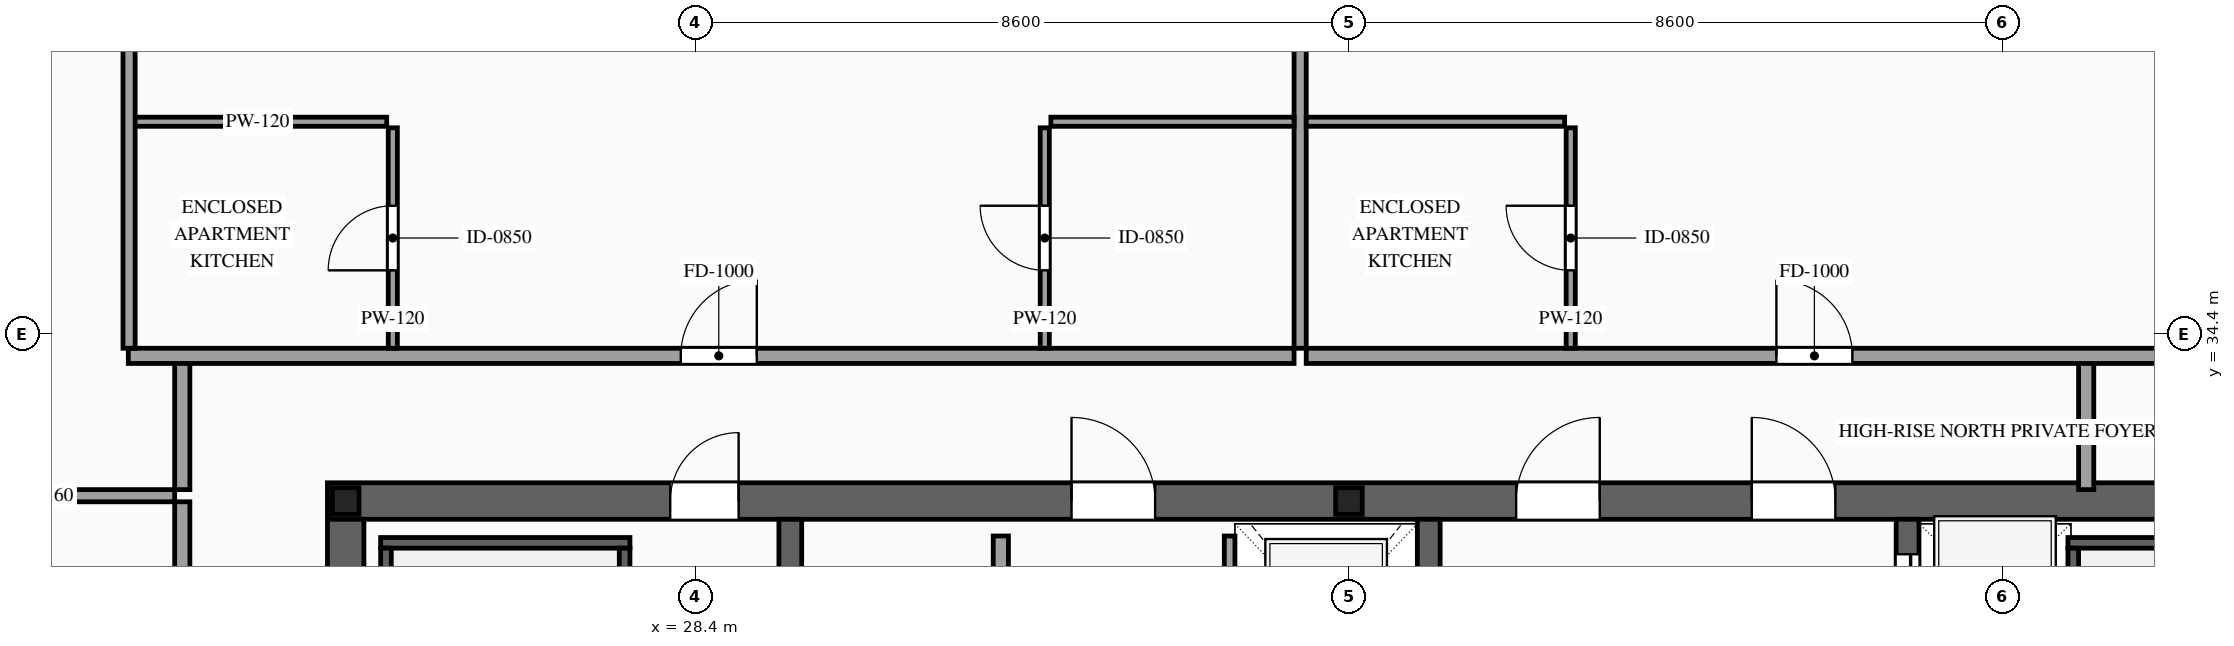
"""IFC4 building model, lengths in metres.
Left out: names, types, materials, properties, quantities, classifications, styles, units other than length and angle.
Written with IfcOpenShell. Run it as: python <this file> out.ifc"""

import sys

from ifc_helpers import new_model, si_unit, direction, frame, frame_2d, origin, origin_2d, place, context, subcontext, project, spatial, rectangle, i_section, extrude, source, transform, mapped, element, fill, save


model = new_model("IFC4")
c1 = context("Model", 3, precision=1e-05, world=origin(), true_north=direction((0.0, 1.0)))
c2 = subcontext(c1, "Body", "Model", "MODEL_VIEW")
j1 = project(units=[si_unit("LENGTHUNIT", "METRE"), si_unit("PLANEANGLEUNIT", "RADIAN")], contexts=[c1])
p1 = place(None, origin())
s1 = spatial("IfcSite", under=j1, at=p1, CompositionType="ELEMENT")
p2 = place(p1, origin())
s2 = spatial("IfcBuilding", under=s1, at=p2, CompositionType="ELEMENT")
p3 = place(p2, frame((0.0, 0.0, 325.2)))
s3 = spatial("IfcBuildingStorey", under=s2, at=p3, CompositionType="ELEMENT", Elevation=325.2)
p4 = place(p3, frame((23.56, 32.2, 0.0), z_axis=(0.0, 0.0, 1.0), x_axis=(1.0, 0.0, 0.0)))
e1 = element("IfcWall", 1, at=p4, inside=s3, PredefinedType="SHEAR", context=c2, shape_type="SweptSolid", body=[
    extrude(rectangle(XDim=26.88, YDim=0.48, at=frame_2d((13.44, 0.0))), origin(), (0.0, 0.0, 1.0), 3.5),
])
p5 = place(p4, frame((4.51, 0.0, 0.0)))
e2 = element("IfcOpeningElement", 2, at=p5, cuts=e1, PredefinedType="OPENING", context=c2, shape_type="SweptSolid", body=[
    extrude(rectangle(XDim=0.9, YDim=2.15, at=frame_2d((0.45, 1.075))), frame((0.0, 0.255, 0.0), z_axis=(0.0, -1.0, 0.0), x_axis=(1.0, 0.0, 0.0)), (0.0, 0.0, 1.0), 0.51),
])
p6 = place(p4, frame((9.79, 0.0, 0.0)))
e3 = element("IfcOpeningElement", 3, at=p6, cuts=e1, PredefinedType="OPENING", context=c2, shape_type="SweptSolid", body=[
    extrude(rectangle(XDim=1.1, YDim=2.2, at=frame_2d((0.55, 1.1))), frame((0.0, 0.255, 0.0), z_axis=(0.0, -1.0, 0.0), x_axis=(1.0, 0.0, 0.0)), (0.0, 0.0, 1.0), 0.51),
])
p7 = place(p4, frame((15.64, 0.0, 0.0)))
e4 = element("IfcOpeningElement", 4, at=p7, cuts=e1, PredefinedType="OPENING", context=c2, shape_type="SweptSolid", body=[
    extrude(rectangle(XDim=1.1, YDim=2.2, at=frame_2d((0.55, 1.1))), frame((0.0, 0.255, 0.0), z_axis=(0.0, -1.0, 0.0), x_axis=(1.0, 0.0, 0.0)), (0.0, 0.0, 1.0), 0.51),
])
p8 = place(p4, frame((18.74, 0.0, 0.0)))
e5 = element("IfcOpeningElement", 5, at=p8, cuts=e1, PredefinedType="OPENING", context=c2, shape_type="SweptSolid", body=[
    extrude(rectangle(XDim=1.1, YDim=2.2, at=frame_2d((0.55, 1.1))), frame((0.0, 0.255, 0.0), z_axis=(0.0, -1.0, 0.0), x_axis=(1.0, 0.0, 0.0)), (0.0, 0.0, 1.0), 0.51),
])
m1 = source(origin(), c2, "Body", "SweptSolid", [
    extrude(rectangle(XDim=12.32, YDim=0.48, at=frame_2d((6.16, 0.0))), origin(), (0.0, 0.0, 1.0), 3.5),
])
p9 = place(p3, frame((23.8, 19.64, 0.0), z_axis=(0.0, 0.0, 1.0), x_axis=(0.0, 1.0, 0.0)))
e6 = element("IfcWall", 6, at=p9, inside=s3, PredefinedType="SHEAR", context=c2, shape_type="MappedRepresentation", body=[
    mapped(m1, transform((0.0, 0.0, 0.0), scale=1.0)),
])
m2 = source(origin(), c2, "Body", "SweptSolid", [
    extrude(rectangle(XDim=12.32, YDim=0.3, at=frame_2d((6.16, 0.0))), origin(), (0.0, 0.0, 1.0), 3.5),
])
for number, where, z_axis, x_axis in (
    (7, (29.65, 19.64, 0.0), (0.0, 0.0, 1.0), (0.0, 1.0, 0.0)),
    (8, (38.05, 19.64, 0.0), (0.0, 0.0, 1.0), (0.0, 1.0, 0.0)),
):
    element("IfcWall", number, at=place(p3, frame(where, z_axis=z_axis, x_axis=x_axis)), inside=s3, PredefinedType="SOLIDWALL", context=c2, shape_type="MappedRepresentation", body=[
        mapped(m2, transform((0.0, 0.0, 0.0), scale=1.0)),
    ])
p10 = place(p3, frame((44.35, 19.64, 0.0), z_axis=(0.0, 0.0, 1.0), x_axis=(0.0, 1.0, 0.0)))
e9 = element("IfcWall", 9, at=p10, inside=s3, PredefinedType="SOLIDWALL", context=c2, shape_type="SweptSolid", body=[
    extrude(rectangle(XDim=12.32, YDim=0.3, at=frame_2d((6.16, 0.0))), origin(), (0.0, 0.0, 1.0), 3.5),
])
p11 = place(p10, frame((6.56, 0.0, 0.0)))
e10 = element("IfcOpeningElement", 10, at=p11, cuts=e9, PredefinedType="OPENING", context=c2, shape_type="SweptSolid", body=[
    extrude(rectangle(XDim=1.1, YDim=2.2, at=frame_2d((0.55, 1.1))), frame((0.0, 0.165, 0.0), z_axis=(0.0, -1.0, 0.0), x_axis=(1.0, 0.0, 0.0)), (0.0, 0.0, 1.0), 0.33),
])
p12 = place(p10, frame((8.66, 0.0, 0.0)))
e11 = element("IfcOpeningElement", 11, at=p12, cuts=e9, PredefinedType="OPENING", context=c2, shape_type="SweptSolid", body=[
    extrude(rectangle(XDim=1.1, YDim=2.2, at=frame_2d((0.55, 1.1))), frame((0.0, 0.165, 0.0), z_axis=(0.0, -1.0, 0.0), x_axis=(1.0, 0.0, 0.0)), (0.0, 0.0, 1.0), 0.33),
])
p13 = place(p10, frame((10.76, 0.0, 0.0)))
e12 = element("IfcOpeningElement", 12, at=p13, cuts=e9, PredefinedType="OPENING", context=c2, shape_type="SweptSolid", body=[
    extrude(rectangle(XDim=1.1, YDim=2.2, at=frame_2d((0.55, 1.1))), frame((0.0, 0.165, 0.0), z_axis=(0.0, -1.0, 0.0), x_axis=(1.0, 0.0, 0.0)), (0.0, 0.0, 1.0), 0.33),
])
m3 = source(origin(), c2, "Body", "SweptSolid", [
    extrude(i_section(OverallWidth=0.35, OverallDepth=0.35, WebThickness=0.012, FlangeThickness=0.019, at=origin_2d()), origin(), (0.0, 0.0, 1.0), 3.5),
])
for number, where, z_axis, x_axis in (
    (13, (23.8, 32.2, 0.0), (0.0, 0.0, 1.0), (1.0, 0.0, 0.0)),
    (14, (37.0, 32.2, 0.0), (0.0, 0.0, 1.0), (1.0, 0.0, 0.0)),
):
    element("IfcColumn", number, at=place(p3, frame(where, z_axis=z_axis, x_axis=x_axis)), inside=s3, PredefinedType="COLUMN", context=c2, shape_type="MappedRepresentation", body=[
        mapped(m3, transform((0.0, 0.0, 0.0), scale=1.0)),
    ])
p14 = place(p3, frame((35.43, 29.4, 0.0), z_axis=(0.0, 0.0, 1.0), x_axis=(0.0, 1.0, 0.0)))
e15 = element("IfcWall", 15, at=p14, inside=s3, PredefinedType="SOLIDWALL", context=c2, shape_type="SweptSolid", body=[
    extrude(rectangle(XDim=2.34, YDim=0.14, at=frame_2d((1.17, 0.0))), origin(), (0.0, 0.0, 1.0), 3.28),
])
p15 = place(p14, frame((0.62, 0.0, 0.0)))
e16 = element("IfcOpeningElement", 16, at=p15, cuts=e15, PredefinedType="OPENING", context=c2, shape_type="SweptSolid", body=[
    extrude(rectangle(XDim=1.1, YDim=2.2, at=frame_2d((0.55, 1.1))), frame((0.0, 0.085, 0.0), z_axis=(0.0, -1.0, 0.0), x_axis=(1.0, 0.0, 0.0)), (0.0, 0.0, 1.0), 0.17),
])
m4 = source(origin(), c2, "Body", "SweptSolid", [
    extrude(rectangle(XDim=3.28, YDim=0.14, at=frame_2d((1.64, 0.0))), origin(), (0.0, 0.0, 1.0), 3.28),
])
p16 = place(p3, frame((24.26, 31.65, 0.0), z_axis=(0.0, 0.0, 1.0), x_axis=(1.0, 0.0, 0.0)))
e17 = element("IfcWall", 17, at=p16, inside=s3, PredefinedType="SOLIDWALL", context=c2, shape_type="MappedRepresentation", body=[
    mapped(m4, transform((0.0, 0.0, 0.0), scale=1.0)),
])
m5 = source(origin(), c2, "Body", "SweptSolid", [
    extrude(rectangle(XDim=8.94, YDim=0.14, at=frame_2d((4.47, 0.0))), origin(), (0.0, 0.0, 1.0), 3.28),
])
for number, where, z_axis, x_axis in (
    (18, (24.33, 22.64, 0.0), (0.0, 0.0, 1.0), (0.0, 1.0, 0.0)),
    (19, (27.47, 22.64, 0.0), (0.0, 0.0, 1.0), (0.0, 1.0, 0.0)),
):
    element("IfcWall", number, at=place(p3, frame(where, z_axis=z_axis, x_axis=x_axis)), inside=s3, PredefinedType="SOLIDWALL", context=c2, shape_type="MappedRepresentation", body=[
        mapped(m5, transform((0.0, 0.0, 0.0), scale=1.0)),
    ])
p17 = place(p3, frame((46.46, 31.65, 0.0), z_axis=(0.0, 0.0, 1.0), x_axis=(1.0, 0.0, 0.0)))
e20 = element("IfcWall", 20, at=p17, inside=s3, PredefinedType="SOLIDWALL", context=c2, shape_type="MappedRepresentation", body=[
    mapped(m4, transform((0.0, 0.0, 0.0), scale=1.0)),
])
p18 = place(p3, frame((46.53, 22.64, 0.0), z_axis=(0.0, 0.0, 1.0), x_axis=(0.0, 1.0, 0.0)))
e21 = element("IfcWall", 21, at=p18, inside=s3, PredefinedType="SOLIDWALL", context=c2, shape_type="MappedRepresentation", body=[
    mapped(m5, transform((0.0, 0.0, 0.0), scale=1.0)),
])
p19 = place(p3, frame((32.42, 19.86, 0.0), z_axis=(0.0, 0.0, 1.0), x_axis=(0.0, 1.0, 0.0)))
e22 = element("IfcWall", 22, at=p19, inside=s3, PredefinedType="PARTITIONING", context=c2, shape_type="SweptSolid", body=[
    extrude(rectangle(XDim=11.88, YDim=0.2, at=frame_2d((5.94, 0.0))), origin(), (0.0, 0.0, 1.0), 3.28),
])
p20 = place(p19, frame((5.49, 0.0, 0.0)))
e23 = element("IfcOpeningElement", 23, at=p20, cuts=e22, PredefinedType="OPENING", context=c2, shape_type="SweptSolid", body=[
    extrude(rectangle(XDim=0.9, YDim=2.15, at=frame_2d((0.45, 1.075))), frame((0.0, 0.115, 0.0), z_axis=(0.0, -1.0, 0.0), x_axis=(1.0, 0.0, 0.0)), (0.0, 0.0, 1.0), 0.23),
])
m6 = source(origin(), c2, "Body", "SweptSolid", [
    extrude(rectangle(XDim=1.7, YDim=0.2, at=frame_2d((0.85, 0.0))), origin(), (0.0, 0.0, 1.0), 3.28),
])
for number, where, z_axis, x_axis in (
    (24, (21.65, 32.35, 0.0), (0.0, 0.0, 1.0), (0.0, 1.0, 0.0)),
    (25, (46.7, 32.35, 0.0), (0.0, 0.0, 1.0), (0.0, 1.0, 0.0)),
):
    element("IfcWall", number, at=place(p3, frame(where, z_axis=z_axis, x_axis=x_axis)), inside=s3, PredefinedType="PARTITIONING", context=c2, shape_type="MappedRepresentation", body=[
        mapped(m6, transform((0.0, 0.0, 0.0), scale=1.0)),
    ])
p21 = place(p3, frame((20.94, 34.11, 0.0), z_axis=(0.0, 0.0, 1.0), x_axis=(1.0, 0.0, 0.0)))
e26 = element("IfcWall", 26, at=p21, inside=s3, PredefinedType="PARTITIONING", context=c2, shape_type="SweptSolid", body=[
    extrude(rectangle(XDim=15.338, YDim=0.2, at=frame_2d((7.669, 0.0))), origin(), (0.0, 0.0, 1.0), 3.28),
])
p22 = place(p21, frame((7.269, 0.0, 0.0)))
e27 = element("IfcOpeningElement", 27, at=p22, cuts=e26, PredefinedType="OPENING", context=c2, shape_type="SweptSolid", body=[
    extrude(rectangle(XDim=1.0, YDim=2.2, at=frame_2d((0.5, 1.1))), frame((0.0, 0.115, 0.0), z_axis=(0.0, -1.0, 0.0), x_axis=(1.0, 0.0, 0.0)), (0.0, 0.0, 1.0), 0.23),
])
m7 = source(origin(), c2, "Body", "SweptSolid", [
    extrude(rectangle(XDim=10.54, YDim=0.16, at=frame_2d((5.27, 0.0))), origin(), (0.0, 0.0, 1.0), 3.28),
])
p23 = place(p3, frame((36.358, 34.21, 0.0), z_axis=(0.0, 0.0, 1.0), x_axis=(0.0, 1.0, 0.0)))
e28 = element("IfcWall", 28, at=p23, inside=s3, PredefinedType="PARTITIONING", context=c2, shape_type="MappedRepresentation", body=[
    mapped(m7, transform((0.0, 0.0, 0.0), scale=1.0)),
])
m8 = source(origin(), c2, "Body", "SweptSolid", [
    extrude(rectangle(XDim=3.4, YDim=0.12, at=frame_2d((1.7, 0.0))), origin(), (0.0, 0.0, 1.0), 3.28),
])
p24 = place(p3, frame((20.94, 37.19, 0.0), z_axis=(0.0, 0.0, 1.0), x_axis=(1.0, 0.0, 0.0)))
e29 = element("IfcWall", 29, at=p24, inside=s3, PredefinedType="PARTITIONING", context=c2, shape_type="MappedRepresentation", body=[
    mapped(m8, transform((0.0, 0.0, 0.0), scale=1.0)),
])
p25 = place(p3, frame((24.42, 34.21, 0.0), z_axis=(0.0, 0.0, 1.0), x_axis=(0.0, 1.0, 0.0)))
e30 = element("IfcWall", 30, at=p25, inside=s3, PredefinedType="PARTITIONING", context=c2, shape_type="SweptSolid", body=[
    extrude(rectangle(XDim=2.9, YDim=0.12, at=frame_2d((1.45, 0.0))), origin(), (0.0, 0.0, 1.0), 3.28),
])
p26 = place(p25, frame((1.025, 0.0, 0.0)))
e31 = element("IfcOpeningElement", 31, at=p26, cuts=e30, PredefinedType="OPENING", context=c2, shape_type="SweptSolid", body=[
    extrude(rectangle(XDim=0.85, YDim=2.1, at=frame_2d((0.425, 1.05))), frame((0.0, 0.075, 0.0), z_axis=(0.0, -1.0, 0.0), x_axis=(1.0, 0.0, 0.0)), (0.0, 0.0, 1.0), 0.15),
])
m9 = source(origin(), c2, "Body", "SweptSolid", [
    extrude(rectangle(XDim=3.2, YDim=0.12, at=frame_2d((1.6, 0.0))), origin(), (0.0, 0.0, 1.0), 3.28),
])
p27 = place(p3, frame((33.078, 37.19, 0.0), z_axis=(0.0, 0.0, 1.0), x_axis=(1.0, 0.0, 0.0)))
e32 = element("IfcWall", 32, at=p27, inside=s3, PredefinedType="PARTITIONING", context=c2, shape_type="MappedRepresentation", body=[
    mapped(m9, transform((0.0, 0.0, 0.0), scale=1.0)),
])
p28 = place(p3, frame((32.998, 34.21, 0.0), z_axis=(0.0, 0.0, 1.0), x_axis=(0.0, 1.0, 0.0)))
e33 = element("IfcWall", 33, at=p28, inside=s3, PredefinedType="PARTITIONING", context=c2, shape_type="SweptSolid", body=[
    extrude(rectangle(XDim=2.9, YDim=0.12, at=frame_2d((1.45, 0.0))), origin(), (0.0, 0.0, 1.0), 3.28),
])
p29 = place(p28, frame((1.025, 0.0, 0.0)))
e34 = element("IfcOpeningElement", 34, at=p29, cuts=e33, PredefinedType="OPENING", context=c2, shape_type="SweptSolid", body=[
    extrude(rectangle(XDim=0.85, YDim=2.1, at=frame_2d((0.425, 1.05))), frame((0.0, 0.075, 0.0), z_axis=(0.0, -1.0, 0.0), x_axis=(1.0, 0.0, 0.0)), (0.0, 0.0, 1.0), 0.15),
])
p30 = place(p3, frame((36.438, 34.11, 0.0), z_axis=(0.0, 0.0, 1.0), x_axis=(1.0, 0.0, 0.0)))
e35 = element("IfcWall", 35, at=p30, inside=s3, PredefinedType="PARTITIONING", context=c2, shape_type="SweptSolid", body=[
    extrude(rectangle(XDim=16.622, YDim=0.2, at=frame_2d((8.311, 0.0))), origin(), (0.0, 0.0, 1.0), 3.28),
])
p31 = place(p30, frame((6.186, 0.0, 0.0)))
e36 = element("IfcOpeningElement", 36, at=p31, cuts=e35, PredefinedType="OPENING", context=c2, shape_type="SweptSolid", body=[
    extrude(rectangle(XDim=1.0, YDim=2.2, at=frame_2d((0.5, 1.1))), frame((0.0, 0.115, 0.0), z_axis=(0.0, -1.0, 0.0), x_axis=(1.0, 0.0, 0.0)), (0.0, 0.0, 1.0), 0.23),
])
m10 = source(origin(), c2, "Body", "SweptSolid", [
    extrude(rectangle(XDim=10.39, YDim=0.16, at=frame_2d((5.195, 0.0))), origin(), (0.0, 0.0, 1.0), 3.28),
])
p32 = place(p3, frame((20.95, 34.21, 0.0), z_axis=(0.0, 0.0, 1.0), x_axis=(0.0, 1.0, 0.0)))
e37 = element("IfcWall", 37, at=p32, inside=s3, PredefinedType="PARTITIONING", context=c2, shape_type="MappedRepresentation", body=[
    mapped(m10, transform((0.0, 0.0, 0.0), scale=1.0)),
])
m11 = source(origin(), c2, "Body", "SweptSolid", [
    extrude(rectangle(XDim=3.4, YDim=0.12, at=frame_2d((1.7, 0.0))), origin(), (0.0, 0.0, 1.0), 3.28),
])
p33 = place(p3, frame((36.438, 37.19, 0.0), z_axis=(0.0, 0.0, 1.0), x_axis=(1.0, 0.0, 0.0)))
e38 = element("IfcWall", 38, at=p33, inside=s3, PredefinedType="PARTITIONING", context=c2, shape_type="MappedRepresentation", body=[
    mapped(m11, transform((0.0, 0.0, 0.0), scale=1.0)),
])
p34 = place(p3, frame((39.918, 34.21, 0.0), z_axis=(0.0, 0.0, 1.0), x_axis=(0.0, 1.0, 0.0)))
e39 = element("IfcWall", 39, at=p34, inside=s3, PredefinedType="PARTITIONING", context=c2, shape_type="SweptSolid", body=[
    extrude(rectangle(XDim=2.9, YDim=0.12, at=frame_2d((1.45, 0.0))), origin(), (0.0, 0.0, 1.0), 3.28),
])
p35 = place(p34, frame((1.025, 0.0, 0.0)))
e40 = element("IfcOpeningElement", 40, at=p35, cuts=e39, PredefinedType="OPENING", context=c2, shape_type="SweptSolid", body=[
    extrude(rectangle(XDim=0.85, YDim=2.1, at=frame_2d((0.425, 1.05))), frame((0.0, 0.075, 0.0), z_axis=(0.0, -1.0, 0.0), x_axis=(1.0, 0.0, 0.0)), (0.0, 0.0, 1.0), 0.15),
])
p36 = place(p3, frame((21.65, 19.41, 0.0), z_axis=(0.0, 0.0, 1.0), x_axis=(0.0, 1.0, 0.0)))
e41 = element("IfcWall", 41, at=p36, inside=s3, PredefinedType="PARTITIONING", context=c2, shape_type="SweptSolid", body=[
    extrude(rectangle(XDim=12.78, YDim=0.2, at=frame_2d((6.39, 0.0))), origin(), (0.0, 0.0, 1.0), 3.28),
])
p37 = place(p36, frame((5.89, 0.0, 0.0)))
e42 = element("IfcOpeningElement", 42, at=p37, cuts=e41, PredefinedType="OPENING", context=c2, shape_type="SweptSolid", body=[
    extrude(rectangle(XDim=1.0, YDim=2.2, at=frame_2d((0.5, 1.1))), frame((0.0, 0.115, 0.0), z_axis=(0.0, -1.0, 0.0), x_axis=(1.0, 0.0, 0.0)), (0.0, 0.0, 1.0), 0.23),
])
m12 = source(origin(), c2, "Body", "SweptSolid", [
    extrude(rectangle(XDim=3.5, YDim=0.16, at=frame_2d((1.75, 0.0))), origin(), (0.0, 0.0, 1.0), 2.825),
])
p38 = place(p3, frame((18.05, 32.27, 0.0), z_axis=(0.0, 0.0, 1.0), x_axis=(1.0, 0.0, 0.0)))
e43 = element("IfcWall", 43, at=p38, inside=s3, PredefinedType="PARTITIONING", context=c2, shape_type="MappedRepresentation", body=[
    mapped(m12, transform((0.0, 0.0, 0.0), scale=1.0)),
])
m13 = source(origin(), c2, "Body", "SweptSolid", [
    extrude(rectangle(XDim=1.1, YDim=2.2, at=frame_2d((0.55, 1.1))), frame((0.0, 0.025, 0.0), z_axis=(0.0, -1.0, 0.0), x_axis=(1.0, 0.0, 0.0)), (0.0, 0.0, 1.0), 0.05),
])
p39 = place(p13, origin())
e44 = element("IfcDoor", 44, at=p39, inside=s3, OperationType="SLIDING_TO_LEFT", PredefinedType="DOOR", context=c2, shape_type="MappedRepresentation", body=[
    mapped(m13, transform((0.0, 0.0, 0.0), scale=1.0)),
])
fill(e12, e44)
m14 = source(origin(), c2, "Body", "SweptSolid", [
    extrude(rectangle(XDim=0.9, YDim=2.15, at=frame_2d((0.45, 1.075))), frame((0.0, 0.025, 0.0), z_axis=(0.0, -1.0, 0.0), x_axis=(1.0, 0.0, 0.0)), (0.0, 0.0, 1.0), 0.05),
])
p40 = place(p5, origin())
e45 = element("IfcDoor", 45, at=p40, inside=s3, OperationType="SINGLE_SWING_RIGHT", PredefinedType="DOOR", context=c2, shape_type="MappedRepresentation", body=[
    mapped(m14, transform((0.0, 0.0, 0.0), scale=1.0)),
])
fill(e2, e45)
m15 = source(origin(), c2, "Body", "SweptSolid", [
    extrude(rectangle(XDim=1.1, YDim=2.2, at=frame_2d((0.55, 1.1))), frame((0.0, 0.025, 0.0), z_axis=(0.0, -1.0, 0.0), x_axis=(1.0, 0.0, 0.0)), (0.0, 0.0, 1.0), 0.05),
])
p41 = place(p6, origin())
e46 = element("IfcDoor", 46, at=p41, inside=s3, OperationType="SINGLE_SWING_LEFT", PredefinedType="DOOR", context=c2, shape_type="MappedRepresentation", body=[
    mapped(m15, transform((0.0, 0.0, 0.0), scale=1.0)),
])
fill(e3, e46)
p42 = place(p7, origin())
e47 = element("IfcDoor", 47, at=p42, inside=s3, OperationType="SINGLE_SWING_RIGHT", PredefinedType="DOOR", context=c2, shape_type="MappedRepresentation", body=[
    mapped(m15, transform((0.0, 0.0, 0.0), scale=1.0)),
])
fill(e4, e47)
p43 = place(p8, origin())
e48 = element("IfcDoor", 48, at=p43, inside=s3, OperationType="SINGLE_SWING_LEFT", PredefinedType="DOOR", context=c2, shape_type="MappedRepresentation", body=[
    mapped(m15, transform((0.0, 0.0, 0.0), scale=1.0)),
])
fill(e5, e48)
m16 = source(origin(), c2, "Body", "SweptSolid", [
    extrude(rectangle(XDim=1.0, YDim=2.2, at=frame_2d((0.5, 1.1))), frame((0.0, 0.025, 0.0), z_axis=(0.0, -1.0, 0.0), x_axis=(1.0, 0.0, 0.0)), (0.0, 0.0, 1.0), 0.05),
])
p44 = place(p22, origin())
e49 = element("IfcDoor", 49, at=p44, inside=s3, OperationType="SINGLE_SWING_RIGHT", PredefinedType="DOOR", context=c2, shape_type="MappedRepresentation", body=[
    mapped(m16, transform((0.0, 0.0, 0.0), scale=1.0)),
])
fill(e27, e49)
m17 = source(origin(), c2, "Body", "SweptSolid", [
    extrude(rectangle(XDim=0.85, YDim=2.1, at=frame_2d((0.425, 1.05))), frame((0.0, 0.025, 0.0), z_axis=(0.0, -1.0, 0.0), x_axis=(1.0, 0.0, 0.0)), (0.0, 0.0, 1.0), 0.05),
])
p45 = place(p26, origin())
e50 = element("IfcDoor", 50, at=p45, inside=s3, OperationType="SINGLE_SWING_LEFT", PredefinedType="DOOR", context=c2, shape_type="MappedRepresentation", body=[
    mapped(m17, transform((0.0, 0.0, 0.0), scale=1.0)),
])
fill(e31, e50)
p46 = place(p29, origin())
e51 = element("IfcDoor", 51, at=p46, inside=s3, OperationType="SINGLE_SWING_RIGHT", PredefinedType="DOOR", context=c2, shape_type="MappedRepresentation", body=[
    mapped(m17, transform((0.0, 0.0, 0.0), scale=1.0)),
])
fill(e34, e51)
p47 = place(p31, origin())
e52 = element("IfcDoor", 52, at=p47, inside=s3, OperationType="SINGLE_SWING_LEFT", PredefinedType="DOOR", context=c2, shape_type="MappedRepresentation", body=[
    mapped(m16, transform((0.0, 0.0, 0.0), scale=1.0)),
])
fill(e36, e52)
p48 = place(p35, origin())
e53 = element("IfcDoor", 53, at=p48, inside=s3, OperationType="SINGLE_SWING_RIGHT", PredefinedType="DOOR", context=c2, shape_type="MappedRepresentation", body=[
    mapped(m17, transform((0.0, 0.0, 0.0), scale=1.0)),
])
fill(e40, e53)
save(model, sys.argv[1])
